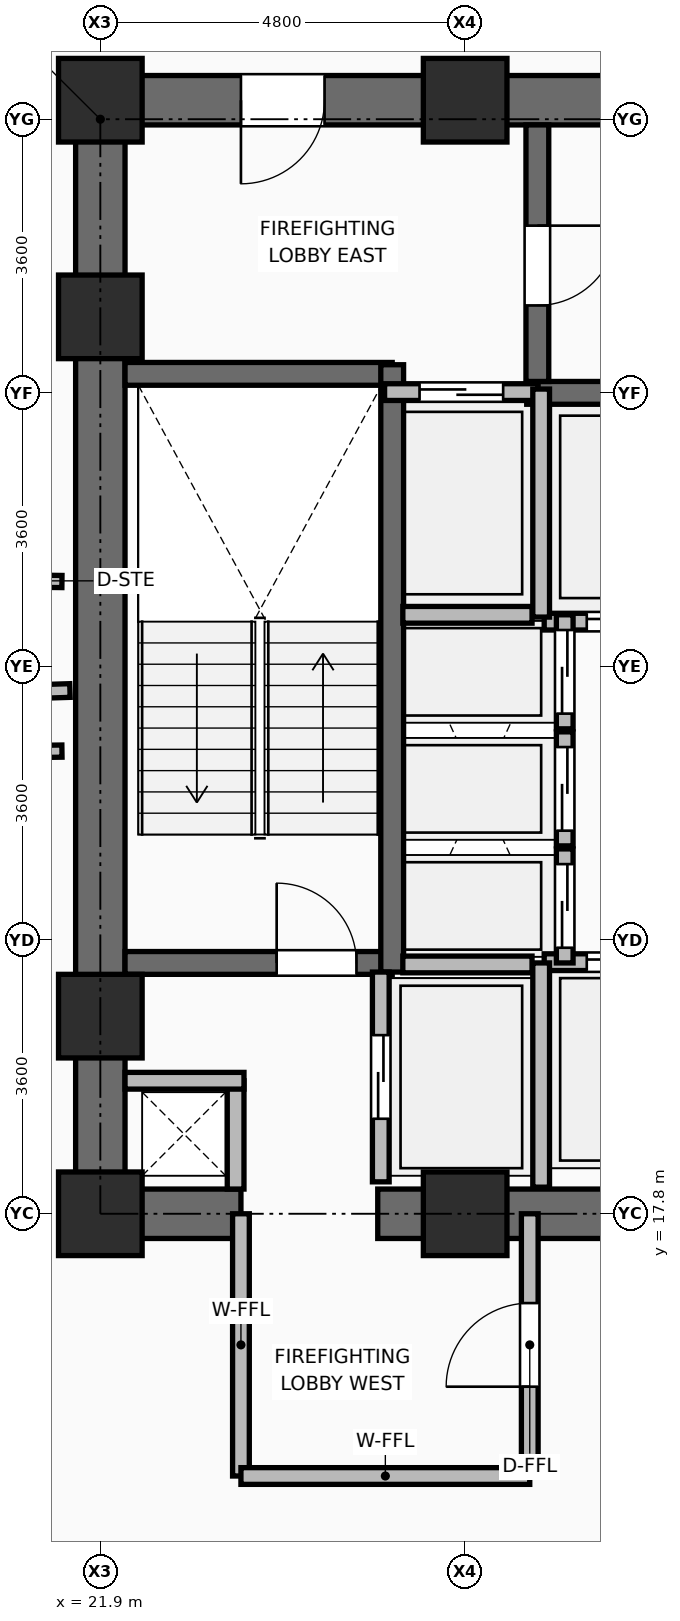
"""IFC4 building model, lengths in metres.
Left out: names, types, materials, properties, quantities, classifications, styles, units other than length and angle.
Written with IfcOpenShell. Run it as: python <this file> out.ifc"""

import sys

from ifc_helpers import new_model, si_unit, direction, frame, frame_2d, origin, origin_2d, place, context, subcontext, project, spatial, rectangle, extrude, element, fill, save


model = new_model("IFC4")
c1 = context("Model", 3, precision=1e-05, world=origin(), true_north=direction((0.0, 1.0)))
c2 = subcontext(c1, "Body", "Model", "MODEL_VIEW")
j1 = project(units=[si_unit("LENGTHUNIT", "METRE"), si_unit("PLANEANGLEUNIT", "RADIAN")], contexts=[c1])
p1 = place(None, origin())
s1 = spatial("IfcSite", under=j1, at=p1, CompositionType="ELEMENT")
p2 = place(p1, origin())
s2 = spatial("IfcBuilding", under=s1, at=p2, CompositionType="ELEMENT")
p3 = place(p2, frame((0.0, 0.0, 53.25)))
s3 = spatial("IfcBuildingStorey", under=s2, at=p3, CompositionType="ELEMENT", Elevation=53.25)
for number, where, z_axis, x_axis in (
    (1, (21.9, 17.8, 0.0), (0.0, 0.0, 1.0), (1.0, 0.0, 0.0)),
    (2, (26.7, 17.8, 0.0), (0.0, 0.0, 1.0), (1.0, 0.0, 0.0)),
    (3, (21.9, 20.4, 0.0), (0.0, 0.0, 1.0), (1.0, 0.0, 0.0)),
    (4, (21.9, 29.6, 0.0), (0.0, 0.0, 1.0), (1.0, 0.0, 0.0)),
    (5, (21.9, 32.45, 0.0), (0.0, 0.0, 1.0), (1.0, 0.0, 0.0)),
    (6, (26.7, 32.45, 0.0), (0.0, 0.0, 1.0), (1.0, 0.0, 0.0)),
):
    element("IfcColumn", number, at=place(p3, frame(where, z_axis=z_axis, x_axis=x_axis)), inside=s3, PredefinedType="COLUMN", context=c2, shape_type="SweptSolid", body=[
        extrude(rectangle(XDim=1.1, YDim=1.1, at=origin_2d()), origin(), (0.0, 0.0, 1.0), 3.75),
    ])
p4 = place(p3, frame((21.575, 17.8, 0.0), z_axis=(0.0, 0.0, 1.0), x_axis=(1.0, 0.0, 0.0)))
e7 = element("IfcWall", 7, at=p4, inside=s3, PredefinedType="SHEAR", context=c2, shape_type="SweptSolid", body=[
    extrude(rectangle(XDim=2.175, YDim=0.65, at=frame_2d((1.087, 0.0))), origin(), (0.0, 0.0, 1.0), 3.57),
])
p5 = place(p3, frame((25.55, 17.8, 0.0), z_axis=(0.0, 0.0, 1.0), x_axis=(1.0, 0.0, 0.0)))
e8 = element("IfcWall", 8, at=p5, inside=s3, PredefinedType="SHEAR", context=c2, shape_type="SweptSolid", body=[
    extrude(rectangle(XDim=6.9, YDim=0.65, at=frame_2d((3.45, 0.0))), origin(), (0.0, 0.0, 1.0), 3.57),
])
p6 = place(p3, frame((21.575, 32.45, 0.0), z_axis=(0.0, 0.0, 1.0), x_axis=(1.0, 0.0, 0.0)))
e9 = element("IfcWall", 9, at=p6, inside=s3, PredefinedType="SHEAR", context=c2, shape_type="SweptSolid", body=[
    extrude(rectangle(XDim=19.85, YDim=0.65, at=frame_2d((9.925, 0.0))), origin(), (0.0, 0.0, 1.0), 3.57),
])
p7 = place(p6, frame((2.175, 0.0, 0.0)))
e10 = element("IfcOpeningElement", 10, at=p7, cuts=e9, PredefinedType="OPENING", context=c2, shape_type="SweptSolid", body=[
    extrude(rectangle(XDim=1.1, YDim=2.1, at=frame_2d((0.55, 1.05))), frame((0.0, 0.335, 0.0), z_axis=(0.0, -1.0, 0.0), x_axis=(1.0, 0.0, 0.0)), (0.0, 0.0, 1.0), 0.67),
])
p8 = place(p6, frame((15.565, 0.0, 0.0)))
e11 = element("IfcOpeningElement", 11, at=p8, cuts=e9, PredefinedType="OPENING", context=c2, shape_type="SweptSolid", body=[
    extrude(rectangle(XDim=1.0, YDim=2.1, at=frame_2d((0.5, 1.05))), frame((0.0, 0.335, 0.0), z_axis=(0.0, -1.0, 0.0), x_axis=(1.0, 0.0, 0.0)), (0.0, 0.0, 1.0), 0.67),
])
p9 = place(p6, frame((17.575, 0.0, 0.0)))
e12 = element("IfcOpeningElement", 12, at=p9, cuts=e9, PredefinedType="OPENING", context=c2, shape_type="SweptSolid", body=[
    extrude(rectangle(XDim=0.9, YDim=2.1, at=frame_2d((0.45, 1.05))), frame((0.0, 0.335, 0.0), z_axis=(0.0, -1.0, 0.0), x_axis=(1.0, 0.0, 0.0)), (0.0, 0.0, 1.0), 0.67),
])
p10 = place(p3, frame((21.9, 18.125, 0.0), z_axis=(0.0, 0.0, 1.0), x_axis=(0.0, 1.0, 0.0)))
e13 = element("IfcWall", 13, at=p10, inside=s3, PredefinedType="SHEAR", context=c2, shape_type="SweptSolid", body=[
    extrude(rectangle(XDim=14.0, YDim=0.65, at=frame_2d((7.0, 0.0))), origin(), (0.0, 0.0, 1.0), 3.57),
])
p11 = place(p3, frame((22.225, 21.1, 0.0), z_axis=(0.0, 0.0, 1.0), x_axis=(1.0, 0.0, 0.0)))
e14 = element("IfcWall", 14, at=p11, inside=s3, PredefinedType="SHEAR", context=c2, shape_type="SweptSolid", body=[
    extrude(rectangle(XDim=3.515, YDim=0.3, at=frame_2d((1.757, 0.0))), origin(), (0.0, 0.0, 1.0), 3.57),
])
p12 = place(p11, frame((1.995, 0.0, 0.0)))
e15 = element("IfcOpeningElement", 15, at=p12, cuts=e14, PredefinedType="OPENING", context=c2, shape_type="SweptSolid", body=[
    extrude(rectangle(XDim=1.05, YDim=2.1, at=frame_2d((0.525, 1.05))), frame((0.0, 0.16, 0.0), z_axis=(0.0, -1.0, 0.0), x_axis=(1.0, 0.0, 0.0)), (0.0, 0.0, 1.0), 0.32),
])
p13 = place(p3, frame((22.225, 28.85, 0.0), z_axis=(0.0, 0.0, 1.0), x_axis=(1.0, 0.0, 0.0)))
e16 = element("IfcWall", 16, at=p13, inside=s3, PredefinedType="SHEAR", context=c2, shape_type="SweptSolid", body=[
    extrude(rectangle(XDim=3.515, YDim=0.3, at=frame_2d((1.757, 0.0))), origin(), (0.0, 0.0, 1.0), 3.57),
])
p14 = place(p3, frame((25.74, 20.98, 0.0), z_axis=(0.0, 0.0, 1.0), x_axis=(0.0, 1.0, 0.0)))
e17 = element("IfcWall", 17, at=p14, inside=s3, PredefinedType="SHEAR", context=c2, shape_type="SweptSolid", body=[
    extrude(rectangle(XDim=7.99, YDim=0.3, at=frame_2d((3.995, 0.0))), origin(), (0.0, 0.0, 1.0), 3.57),
])
p15 = place(p3, frame((27.51, 28.6, 0.0), z_axis=(0.0, 0.0, 1.0), x_axis=(1.0, 0.0, 0.0)))
e18 = element("IfcWall", 18, at=p15, inside=s3, PredefinedType="SHEAR", context=c2, shape_type="SweptSolid", body=[
    extrude(rectangle(XDim=8.03, YDim=0.3, at=frame_2d((4.015, 0.0))), origin(), (0.0, 0.0, 1.0), 3.57),
])
p16 = place(p3, frame((27.65, 28.75, 0.0), z_axis=(0.0, 0.0, 1.0), x_axis=(0.0, 1.0, 0.0)))
e19 = element("IfcWall", 19, at=p16, inside=s3, PredefinedType="SHEAR", context=c2, shape_type="SweptSolid", body=[
    extrude(rectangle(XDim=3.375, YDim=0.3, at=frame_2d((1.688, 0.0))), origin(), (0.0, 0.0, 1.0), 3.57),
])
p17 = place(p16, frame((1.0, 0.0, 0.0)))
e20 = element("IfcOpeningElement", 20, at=p17, cuts=e19, PredefinedType="OPENING", context=c2, shape_type="SweptSolid", body=[
    extrude(rectangle(XDim=1.05, YDim=2.1, at=frame_2d((0.525, 1.05))), frame((0.0, 0.16, 0.0), z_axis=(0.0, -1.0, 0.0), x_axis=(1.0, 0.0, 0.0)), (0.0, 0.0, 1.0), 0.32),
])
p18 = place(p3, frame((23.68, 18.125, 0.0), z_axis=(0.0, 0.0, 1.0), x_axis=(0.0, 1.0, 0.0)))
e21 = element("IfcWall", 21, at=p18, inside=s3, PredefinedType="PARTITIONING", context=c2, shape_type="SweptSolid", body=[
    extrude(rectangle(XDim=1.425, YDim=0.22, at=frame_2d((0.712, 0.0))), origin(), (0.0, 0.0, 1.0), 3.55),
])
p19 = place(p3, frame((22.225, 19.55, 0.0), z_axis=(0.0, 0.0, 1.0), x_axis=(1.0, 0.0, 0.0)))
e22 = element("IfcWall", 22, at=p19, inside=s3, PredefinedType="PARTITIONING", context=c2, shape_type="SweptSolid", body=[
    extrude(rectangle(XDim=1.565, YDim=0.22, at=frame_2d((0.782, 0.0))), origin(), (0.0, 0.0, 1.0), 2.595),
])
p20 = place(p3, frame((25.59, 18.22, 0.0), z_axis=(0.0, 0.0, 1.0), x_axis=(0.0, 1.0, 0.0)))
e23 = element("IfcWall", 23, at=p20, inside=s3, PredefinedType="PARTITIONING", context=c2, shape_type="SweptSolid", body=[
    extrude(rectangle(XDim=2.76, YDim=0.22, at=frame_2d((1.38, 0.0))), origin(), (0.0, 0.0, 1.0), 3.55),
])
p21 = place(p20, frame((0.83, 0.0, 0.0)))
e24 = element("IfcOpeningElement", 24, at=p21, cuts=e23, PredefinedType="OPENING", context=c2, shape_type="SweptSolid", body=[
    extrude(rectangle(XDim=1.1, YDim=2.2, at=frame_2d((0.55, 1.1))), frame((0.0, 0.12, 0.0), z_axis=(0.0, -1.0, 0.0), x_axis=(1.0, 0.0, 0.0)), (0.0, 0.0, 1.0), 0.24),
])
p22 = place(p3, frame((25.64, 28.61, 0.0), z_axis=(0.0, 0.0, 1.0), x_axis=(1.0, 0.0, 0.0)))
e25 = element("IfcWall", 25, at=p22, inside=s3, PredefinedType="PARTITIONING", context=c2, shape_type="SweptSolid", body=[
    extrude(rectangle(XDim=2.02, YDim=0.22, at=frame_2d((1.01, 0.0))), origin(), (0.0, 0.0, 1.0), 3.55),
])
p23 = place(p22, frame((0.46, 0.0, 0.0)))
e26 = element("IfcOpeningElement", 26, at=p23, cuts=e25, PredefinedType="OPENING", context=c2, shape_type="SweptSolid", body=[
    extrude(rectangle(XDim=1.1, YDim=2.2, at=frame_2d((0.55, 1.1))), frame((0.0, 0.12, 0.0), z_axis=(0.0, -1.0, 0.0), x_axis=(1.0, 0.0, 0.0)), (0.0, 0.0, 1.0), 0.24),
])
p24 = place(p3, frame((27.74, 21.11, 0.0), z_axis=(0.0, 0.0, 1.0), x_axis=(1.0, 0.0, 0.0)))
e27 = element("IfcWall", 27, at=p24, inside=s3, PredefinedType="PARTITIONING", context=c2, shape_type="SweptSolid", body=[
    extrude(rectangle(XDim=2.22, YDim=0.22, at=frame_2d((1.11, 0.0))), origin(), (0.0, 0.0, 1.0), 3.55),
])
p25 = place(p24, frame((0.56, 0.0, 0.0)))
e28 = element("IfcOpeningElement", 28, at=p25, cuts=e27, PredefinedType="OPENING", context=c2, shape_type="SweptSolid", body=[
    extrude(rectangle(XDim=1.1, YDim=2.2, at=frame_2d((0.55, 1.1))), frame((0.0, 0.12, 0.0), z_axis=(0.0, -1.0, 0.0), x_axis=(1.0, 0.0, 0.0)), (0.0, 0.0, 1.0), 0.24),
])
p26 = place(p3, frame((27.74, 25.59, 0.0), z_axis=(0.0, 0.0, 1.0), x_axis=(1.0, 0.0, 0.0)))
e29 = element("IfcWall", 29, at=p26, inside=s3, PredefinedType="PARTITIONING", context=c2, shape_type="SweptSolid", body=[
    extrude(rectangle(XDim=2.22, YDim=0.22, at=frame_2d((1.11, 0.0))), origin(), (0.0, 0.0, 1.0), 3.55),
])
p27 = place(p26, frame((0.56, 0.0, 0.0)))
e30 = element("IfcOpeningElement", 30, at=p27, cuts=e29, PredefinedType="OPENING", context=c2, shape_type="SweptSolid", body=[
    extrude(rectangle(XDim=1.1, YDim=2.2, at=frame_2d((0.55, 1.1))), frame((0.0, 0.12, 0.0), z_axis=(0.0, -1.0, 0.0), x_axis=(1.0, 0.0, 0.0)), (0.0, 0.0, 1.0), 0.24),
])
p28 = place(p3, frame((28.01, 21.1, 0.0), z_axis=(0.0, 0.0, 1.0), x_axis=(0.0, 1.0, 0.0)))
e31 = element("IfcWall", 31, at=p28, inside=s3, PredefinedType="PARTITIONING", context=c2, shape_type="SweptSolid", body=[
    extrude(rectangle(XDim=1.5, YDim=0.22, at=frame_2d((0.75, 0.0))), origin(), (0.0, 0.0, 1.0), 3.55),
])
p29 = place(p28, frame((0.2, 0.0, 0.0)))
e32 = element("IfcOpeningElement", 32, at=p29, cuts=e31, PredefinedType="OPENING", context=c2, shape_type="SweptSolid", body=[
    extrude(rectangle(XDim=1.1, YDim=2.2, at=frame_2d((0.55, 1.1))), frame((0.0, 0.12, 0.0), z_axis=(0.0, -1.0, 0.0), x_axis=(1.0, 0.0, 0.0)), (0.0, 0.0, 1.0), 0.24),
])
p30 = place(p3, frame((28.01, 22.64, 0.0), z_axis=(0.0, 0.0, 1.0), x_axis=(0.0, 1.0, 0.0)))
e33 = element("IfcWall", 33, at=p30, inside=s3, PredefinedType="PARTITIONING", context=c2, shape_type="SweptSolid", body=[
    extrude(rectangle(XDim=1.5, YDim=0.22, at=frame_2d((0.75, 0.0))), origin(), (0.0, 0.0, 1.0), 3.55),
])
p31 = place(p30, frame((0.2, 0.0, 0.0)))
e34 = element("IfcOpeningElement", 34, at=p31, cuts=e33, PredefinedType="OPENING", context=c2, shape_type="SweptSolid", body=[
    extrude(rectangle(XDim=1.1, YDim=2.2, at=frame_2d((0.55, 1.1))), frame((0.0, 0.12, 0.0), z_axis=(0.0, -1.0, 0.0), x_axis=(1.0, 0.0, 0.0)), (0.0, 0.0, 1.0), 0.24),
])
p32 = place(p3, frame((28.01, 24.18, 0.0), z_axis=(0.0, 0.0, 1.0), x_axis=(0.0, 1.0, 0.0)))
e35 = element("IfcWall", 35, at=p32, inside=s3, PredefinedType="PARTITIONING", context=c2, shape_type="SweptSolid", body=[
    extrude(rectangle(XDim=1.5, YDim=0.22, at=frame_2d((0.75, 0.0))), origin(), (0.0, 0.0, 1.0), 3.55),
])
p33 = place(p32, frame((0.2, 0.0, 0.0)))
e36 = element("IfcOpeningElement", 36, at=p33, cuts=e35, PredefinedType="OPENING", context=c2, shape_type="SweptSolid", body=[
    extrude(rectangle(XDim=1.1, YDim=2.2, at=frame_2d((0.55, 1.1))), frame((0.0, 0.12, 0.0), z_axis=(0.0, -1.0, 0.0), x_axis=(1.0, 0.0, 0.0)), (0.0, 0.0, 1.0), 0.24),
])
p34 = place(p3, frame((27.7, 18.15, 0.0), z_axis=(0.0, 0.0, 1.0), x_axis=(0.0, 1.0, 0.0)))
e37 = element("IfcWall", 37, at=p34, inside=s3, PredefinedType="PARTITIONING", context=c2, shape_type="SweptSolid", body=[
    extrude(rectangle(XDim=2.95, YDim=0.22, at=frame_2d((1.475, 0.0))), origin(), (0.0, 0.0, 1.0), 3.55),
])
p35 = place(p3, frame((27.7, 25.65, 0.0), z_axis=(0.0, 0.0, 1.0), x_axis=(0.0, 1.0, 0.0)))
e38 = element("IfcWall", 38, at=p35, inside=s3, PredefinedType="PARTITIONING", context=c2, shape_type="SweptSolid", body=[
    extrude(rectangle(XDim=3.0, YDim=0.22, at=frame_2d((1.5, 0.0))), origin(), (0.0, 0.0, 1.0), 3.55),
])
for number, where, z_axis, x_axis in (
    (39, (25.88, 21.08, 0.0), (0.0, 0.0, 1.0), (1.0, 0.0, 0.0)),
    (40, (25.88, 25.68, 0.0), (0.0, 0.0, 1.0), (1.0, 0.0, 0.0)),
):
    element("IfcWall", number, at=place(p3, frame(where, z_axis=z_axis, x_axis=x_axis)), inside=s3, PredefinedType="PARTITIONING", context=c2, shape_type="SweptSolid", body=[
        extrude(rectangle(XDim=1.7, YDim=0.22, at=frame_2d((0.85, 0.0))), origin(), (0.0, 0.0, 1.0), 3.55),
    ])
p36 = place(p3, frame((23.75, 14.35, 0.0), z_axis=(0.0, 0.0, 1.0), x_axis=(0.0, 1.0, 0.0)))
e41 = element("IfcWall", 41, at=p36, inside=s3, PredefinedType="PARTITIONING", context=c2, shape_type="SweptSolid", body=[
    extrude(rectangle(XDim=3.45, YDim=0.22, at=frame_2d((1.725, 0.0))), origin(), (0.0, 0.0, 1.0), 2.928),
])
p37 = place(p3, frame((23.75, 14.35, 0.0), z_axis=(0.0, 0.0, 1.0), x_axis=(1.0, 0.0, 0.0)))
e42 = element("IfcWall", 42, at=p37, inside=s3, PredefinedType="PARTITIONING", context=c2, shape_type="SweptSolid", body=[
    extrude(rectangle(XDim=3.8, YDim=0.22, at=frame_2d((1.9, 0.0))), origin(), (0.0, 0.0, 1.0), 3.55),
])
p38 = place(p3, frame((27.55, 14.35, 0.0), z_axis=(0.0, 0.0, 1.0), x_axis=(0.0, 1.0, 0.0)))
e43 = element("IfcWall", 43, at=p38, inside=s3, PredefinedType="PARTITIONING", context=c2, shape_type="SweptSolid", body=[
    extrude(rectangle(XDim=3.45, YDim=0.22, at=frame_2d((1.725, 0.0))), origin(), (0.0, 0.0, 1.0), 2.928),
])
p39 = place(p38, frame((1.175, 0.0, 0.0)))
e44 = element("IfcOpeningElement", 44, at=p39, cuts=e43, PredefinedType="OPENING", context=c2, shape_type="SweptSolid", body=[
    extrude(rectangle(XDim=1.1, YDim=2.1, at=frame_2d((0.55, 1.05))), frame((0.0, 0.12, 0.0), z_axis=(0.0, -1.0, 0.0), x_axis=(1.0, 0.0, 0.0)), (0.0, 0.0, 1.0), 0.24),
])
p40 = place(p3, frame((21.395, 26.118, 0.0), z_axis=(0.0, 0.0, 1.0), x_axis=(-0.999931972005, 0.011664105718, 0.0)))
e45 = element("IfcWall", 45, at=p40, inside=s3, PredefinedType="PARTITIONING", context=c2, shape_type="SweptSolid", body=[
    extrude(rectangle(XDim=2.072, YDim=0.16, at=frame_2d((1.036, 0.0))), origin(), (0.0, 0.0, 1.0), 3.55),
])
p41 = place(p40, frame((0.16, 0.0, 0.0)))
e46 = element("IfcOpeningElement", 46, at=p41, cuts=e45, PredefinedType="OPENING", context=c2, shape_type="SweptSolid", body=[
    extrude(rectangle(XDim=1.2, YDim=2.1, at=frame_2d((0.6, 1.05))), frame((0.0, 0.09, 0.0), z_axis=(0.0, -1.0, 0.0), x_axis=(1.0, 0.0, 0.0)), (0.0, 0.0, 1.0), 0.18),
])
p42 = place(p3, frame((19.323, 23.858, 0.0), z_axis=(0.0, 0.0, 1.0), x_axis=(0.999901714038, 0.014020066451, 0.0)))
e47 = element("IfcWall", 47, at=p42, inside=s3, PredefinedType="PARTITIONING", context=c2, shape_type="SweptSolid", body=[
    extrude(rectangle(XDim=2.072, YDim=0.16, at=frame_2d((1.036, 0.0))), origin(), (0.0, 0.0, 1.0), 3.55),
])
p43 = place(p3, frame((21.5, 24.684, 0.0), z_axis=(0.0, 0.0, 1.0), x_axis=(-0.999503357518, -0.031512510382, 0.0)))
e48 = element("IfcWall", 48, at=p43, inside=s3, PredefinedType="PARTITIONING", context=c2, shape_type="SweptSolid", body=[
    extrude(rectangle(XDim=17.013, YDim=0.18, at=frame_2d((8.507, 0.0))), origin(), (0.0, 0.0, 1.0), 2.595),
])
p44 = place(p12, origin())
e49 = element("IfcDoor", 49, at=p44, inside=s3, OperationType="SINGLE_SWING_LEFT", PredefinedType="DOOR", context=c2, shape_type="SweptSolid", body=[
    extrude(rectangle(XDim=1.05, YDim=2.1, at=frame_2d((0.525, 1.05))), frame((0.0, 0.025, 0.0), z_axis=(0.0, -1.0, 0.0), x_axis=(1.0, 0.0, 0.0)), (0.0, 0.0, 1.0), 0.05),
])
fill(e15, e49)
p45 = place(p17, frame((1.05, 0.0, 0.0), z_axis=(0.0, 0.0, 1.0), x_axis=(-1.0, 0.0, 0.0)))
e50 = element("IfcDoor", 50, at=p45, inside=s3, OperationType="SINGLE_SWING_LEFT", PredefinedType="DOOR", context=c2, shape_type="SweptSolid", body=[
    extrude(rectangle(XDim=1.05, YDim=2.1, at=frame_2d((0.525, 1.05))), frame((0.0, 0.025, 0.0), z_axis=(0.0, -1.0, 0.0), x_axis=(1.0, 0.0, 0.0)), (0.0, 0.0, 1.0), 0.05),
])
fill(e20, e50)
p46 = place(p21, origin())
e51 = element("IfcDoor", 51, at=p46, inside=s3, OperationType="DOUBLE_DOOR_SLIDING", PredefinedType="DOOR", context=c2, shape_type="SweptSolid", body=[
    extrude(rectangle(XDim=1.1, YDim=2.2, at=frame_2d((0.55, 1.1))), frame((0.0, 0.025, 0.0), z_axis=(0.0, -1.0, 0.0), x_axis=(1.0, 0.0, 0.0)), (0.0, 0.0, 1.0), 0.05),
])
fill(e24, e51)
p47 = place(p23, origin())
e52 = element("IfcDoor", 52, at=p47, inside=s3, OperationType="DOUBLE_DOOR_SLIDING", PredefinedType="DOOR", context=c2, shape_type="SweptSolid", body=[
    extrude(rectangle(XDim=1.1, YDim=2.2, at=frame_2d((0.55, 1.1))), frame((0.0, 0.025, 0.0), z_axis=(0.0, -1.0, 0.0), x_axis=(1.0, 0.0, 0.0)), (0.0, 0.0, 1.0), 0.05),
])
fill(e26, e52)
p48 = place(p25, origin())
e53 = element("IfcDoor", 53, at=p48, inside=s3, OperationType="DOUBLE_DOOR_SLIDING", PredefinedType="DOOR", context=c2, shape_type="SweptSolid", body=[
    extrude(rectangle(XDim=1.1, YDim=2.2, at=frame_2d((0.55, 1.1))), frame((0.0, 0.025, 0.0), z_axis=(0.0, -1.0, 0.0), x_axis=(1.0, 0.0, 0.0)), (0.0, 0.0, 1.0), 0.05),
])
fill(e28, e53)
p49 = place(p27, frame((1.1, 0.0, 0.0), z_axis=(0.0, 0.0, 1.0), x_axis=(-1.0, 0.0, 0.0)))
e54 = element("IfcDoor", 54, at=p49, inside=s3, OperationType="DOUBLE_DOOR_SLIDING", PredefinedType="DOOR", context=c2, shape_type="SweptSolid", body=[
    extrude(rectangle(XDim=1.1, YDim=2.2, at=frame_2d((0.55, 1.1))), frame((0.0, 0.025, 0.0), z_axis=(0.0, -1.0, 0.0), x_axis=(1.0, 0.0, 0.0)), (0.0, 0.0, 1.0), 0.05),
])
fill(e30, e54)
p50 = place(p29, frame((1.1, 0.0, 0.0), z_axis=(0.0, 0.0, 1.0), x_axis=(-1.0, 0.0, 0.0)))
e55 = element("IfcDoor", 55, at=p50, inside=s3, OperationType="DOUBLE_DOOR_SLIDING", PredefinedType="DOOR", context=c2, shape_type="SweptSolid", body=[
    extrude(rectangle(XDim=1.1, YDim=2.2, at=frame_2d((0.55, 1.1))), frame((0.0, 0.025, 0.0), z_axis=(0.0, -1.0, 0.0), x_axis=(1.0, 0.0, 0.0)), (0.0, 0.0, 1.0), 0.05),
])
fill(e32, e55)
p51 = place(p31, frame((1.1, 0.0, 0.0), z_axis=(0.0, 0.0, 1.0), x_axis=(-1.0, 0.0, 0.0)))
e56 = element("IfcDoor", 56, at=p51, inside=s3, OperationType="DOUBLE_DOOR_SLIDING", PredefinedType="DOOR", context=c2, shape_type="SweptSolid", body=[
    extrude(rectangle(XDim=1.1, YDim=2.2, at=frame_2d((0.55, 1.1))), frame((0.0, 0.025, 0.0), z_axis=(0.0, -1.0, 0.0), x_axis=(1.0, 0.0, 0.0)), (0.0, 0.0, 1.0), 0.05),
])
fill(e34, e56)
p52 = place(p33, frame((1.1, 0.0, 0.0), z_axis=(0.0, 0.0, 1.0), x_axis=(-1.0, 0.0, 0.0)))
e57 = element("IfcDoor", 57, at=p52, inside=s3, OperationType="DOUBLE_DOOR_SLIDING", PredefinedType="DOOR", context=c2, shape_type="SweptSolid", body=[
    extrude(rectangle(XDim=1.1, YDim=2.2, at=frame_2d((0.55, 1.1))), frame((0.0, 0.025, 0.0), z_axis=(0.0, -1.0, 0.0), x_axis=(1.0, 0.0, 0.0)), (0.0, 0.0, 1.0), 0.05),
])
fill(e36, e57)
p53 = place(p39, origin())
e58 = element("IfcDoor", 58, at=p53, inside=s3, OperationType="SINGLE_SWING_LEFT", PredefinedType="DOOR", context=c2, shape_type="SweptSolid", body=[
    extrude(rectangle(XDim=1.1, YDim=2.1, at=frame_2d((0.55, 1.05))), frame((0.0, 0.025, 0.0), z_axis=(0.0, -1.0, 0.0), x_axis=(1.0, 0.0, 0.0)), (0.0, 0.0, 1.0), 0.05),
])
fill(e44, e58)
p54 = place(p7, frame((1.1, 0.0, 0.0), z_axis=(0.0, 0.0, 1.0), x_axis=(-1.0, 0.0, 0.0)))
e59 = element("IfcDoor", 59, at=p54, inside=s3, OperationType="SINGLE_SWING_RIGHT", PredefinedType="DOOR", context=c2, shape_type="SweptSolid", body=[
    extrude(rectangle(XDim=1.1, YDim=2.1, at=frame_2d((0.55, 1.05))), frame((0.0, 0.025, 0.0), z_axis=(0.0, -1.0, 0.0), x_axis=(1.0, 0.0, 0.0)), (0.0, 0.0, 1.0), 0.05),
])
fill(e10, e59)
save(model, sys.argv[1])
